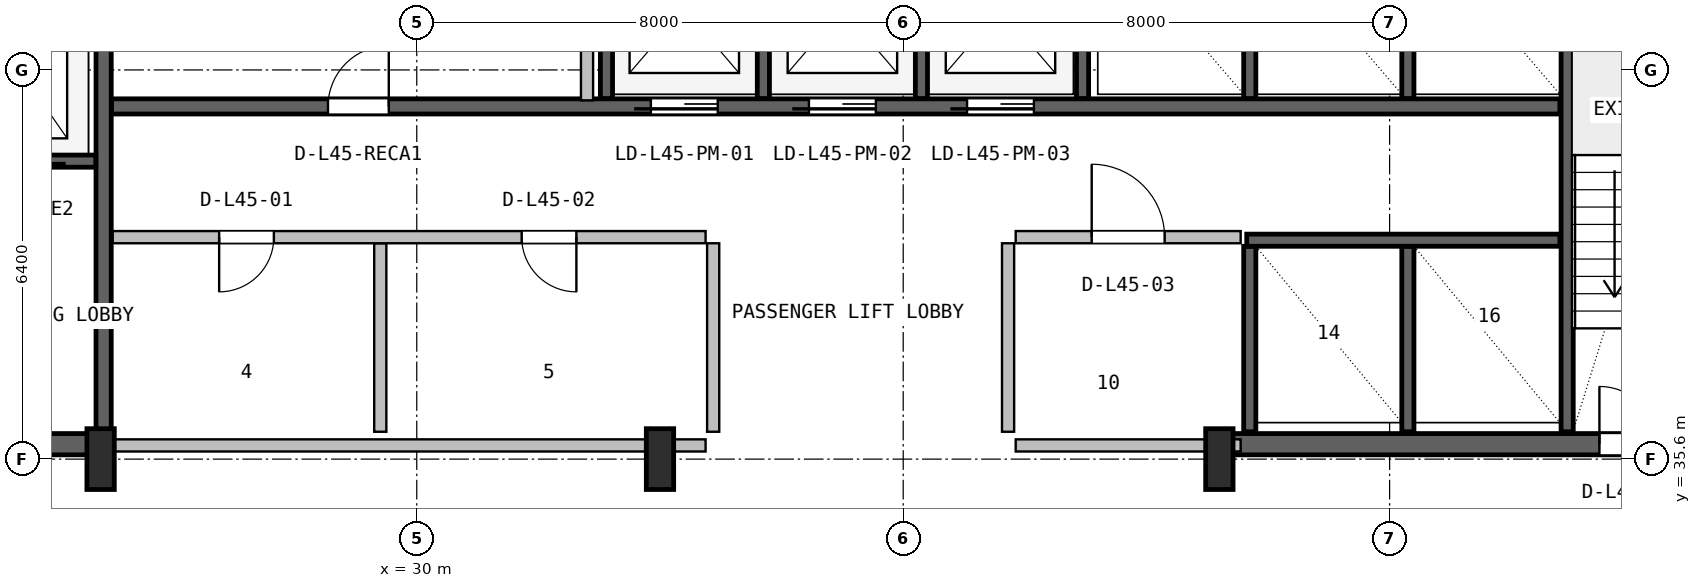
"""IFC4 building model, lengths in metres.
Left out: names, types, materials, properties, quantities, classifications, styles, units other than length and angle.
Written with IfcOpenShell. Run it as: python <this file> out.ifc"""

import sys

from ifc_helpers import new_model, si_unit, direction, frame, frame_2d, origin, origin_2d, place, context, subcontext, project, spatial, rectangle, i_section, extrude, source, transform, mapped, element, fill, save


model = new_model("IFC4")
c1 = context("Model", 3, precision=1e-05, world=origin(), true_north=direction((0.0, 1.0)))
c2 = subcontext(c1, "Body", "Model", "MODEL_VIEW")
j1 = project(units=[si_unit("LENGTHUNIT", "METRE"), si_unit("PLANEANGLEUNIT", "RADIAN")], contexts=[c1])
p1 = place(None, origin())
s1 = spatial("IfcSite", under=j1, at=p1, CompositionType="ELEMENT")
p2 = place(p1, origin())
s2 = spatial("IfcBuilding", under=s1, at=p2, CompositionType="ELEMENT")
p3 = place(p2, frame((0.0, 0.0, 183.8)))
s3 = spatial("IfcBuildingStorey", under=s2, at=p3, CompositionType="ELEMENT", Elevation=183.8)
p4 = place(p3, frame((15.67, 35.845, 0.0), z_axis=(0.0, 0.0, 1.0), x_axis=(1.0, 0.0, 0.0)))
e1 = element("IfcWall", 1, at=p4, inside=s3, PredefinedType="SHEAR", context=c2, shape_type="SweptSolid", body=[
    extrude(rectangle(XDim=9.13, YDim=0.35, at=frame_2d((4.565, 0.0))), origin(), (0.0, 0.0, 1.0), 3.55),
])
p5 = place(p4, frame((5.4, 0.0, 0.0)))
e2 = element("IfcOpeningElement", 2, at=p5, cuts=e1, PredefinedType="OPENING", context=c2, shape_type="SweptSolid", body=[
    extrude(rectangle(XDim=1.0, YDim=2.1, at=frame_2d((0.5, 1.05))), frame((0.0, 0.185, 0.0), z_axis=(0.0, -1.0, 0.0), x_axis=(1.0, 0.0, 0.0)), (0.0, 0.0, 1.0), 0.37),
])
p6 = place(p3, frame((43.2, 35.845, 0.0), z_axis=(0.0, 0.0, 1.0), x_axis=(1.0, 0.0, 0.0)))
e3 = element("IfcWall", 3, at=p6, inside=s3, PredefinedType="SHEAR", context=c2, shape_type="SweptSolid", body=[
    extrude(rectangle(XDim=9.13, YDim=0.35, at=frame_2d((4.565, 0.0))), origin(), (0.0, 0.0, 1.0), 3.55),
])
p7 = place(p6, frame((6.25, 0.0, 0.0)))
e4 = element("IfcOpeningElement", 4, at=p7, cuts=e3, PredefinedType="OPENING", context=c2, shape_type="SweptSolid", body=[
    extrude(rectangle(XDim=0.95, YDim=2.1, at=frame_2d((0.475, 1.05))), frame((0.0, 0.185, 0.0), z_axis=(0.0, -1.0, 0.0), x_axis=(1.0, 0.0, 0.0)), (0.0, 0.0, 1.0), 0.37),
])
m1 = source(origin(), c2, "Body", "SweptSolid", [
    extrude(i_section(OverallWidth=0.45, OverallDepth=1.0, WebThickness=0.016, FlangeThickness=0.03, FilletRadius=0.016, at=origin_2d()), origin(), (0.0, 0.0, 1.0), 3.8),
])
for number, where, z_axis, x_axis in (
    (5, (24.8, 35.6, 0.0), (0.0, 0.0, 1.0), (1.0, 0.0, 0.0)),
    (6, (34.0, 35.6, 0.0), (0.0, 0.0, 1.0), (1.0, 0.0, 0.0)),
    (7, (43.2, 35.6, 0.0), (0.0, 0.0, 1.0), (1.0, 0.0, 0.0)),
):
    element("IfcColumn", number, at=place(p3, frame(where, z_axis=z_axis, x_axis=x_axis)), inside=s3, PredefinedType="COLUMN", context=c2, shape_type="MappedRepresentation", body=[
        mapped(m1, transform((0.0, 0.0, 0.0), x_axis=(1.0, 0.0, 0.0), y_axis=(0.0, 1.0, 0.0), z_axis=(0.0, 0.0, 1.0), scale=1.0)),
    ])
p8 = place(p3, frame((24.85, 36.05, 0.0), z_axis=(0.0, 0.0, 1.0), x_axis=(0.0, 1.0, 0.0)))
e8 = element("IfcWall", 8, at=p8, inside=s3, PredefinedType="SHEAR", context=c2, shape_type="SweptSolid", body=[
    extrude(rectangle(XDim=10.45, YDim=0.25, at=frame_2d((5.225, 0.0))), origin(), (0.0, 0.0, 1.0), 3.55),
])
p9 = place(p3, frame((19.2, 40.5, 0.0), z_axis=(0.0, 0.0, 1.0), x_axis=(1.0, 0.0, 0.0)))
e9 = element("IfcWall", 9, at=p9, inside=s3, PredefinedType="SHEAR", context=c2, shape_type="SweptSolid", body=[
    extrude(rectangle(XDim=5.52, YDim=0.2, at=frame_2d((2.76, 0.0))), origin(), (0.0, 0.0, 1.0), 3.55),
])
p10 = place(p9, frame((1.05, 0.0, 0.0)))
e10 = element("IfcOpeningElement", 10, at=p10, cuts=e9, PredefinedType="OPENING", context=c2, shape_type="SweptSolid", body=[
    extrude(rectangle(XDim=1.1, YDim=2.18, at=frame_2d((0.55, 1.09))), frame((0.0, 0.11, 0.0), z_axis=(0.0, -1.0, 0.0), x_axis=(1.0, 0.0, 0.0)), (0.0, 0.0, 1.0), 0.22),
])
p11 = place(p9, frame((3.65, 0.0, 0.0)))
e11 = element("IfcOpeningElement", 11, at=p11, cuts=e9, PredefinedType="OPENING", context=c2, shape_type="SweptSolid", body=[
    extrude(rectangle(XDim=1.1, YDim=2.18, at=frame_2d((0.55, 1.09))), frame((0.0, 0.11, 0.0), z_axis=(0.0, -1.0, 0.0), x_axis=(1.0, 0.0, 0.0)), (0.0, 0.0, 1.0), 0.22),
])
p12 = place(p3, frame((48.92, 36.05, 0.0), z_axis=(0.0, 0.0, 1.0), x_axis=(0.0, 1.0, 0.0)))
e12 = element("IfcWall", 12, at=p12, inside=s3, PredefinedType="SHEAR", context=c2, shape_type="SweptSolid", body=[
    extrude(rectangle(XDim=10.5, YDim=0.2, at=frame_2d((5.25, 0.0))), origin(), (0.0, 0.0, 1.0), 3.55),
])
p13 = place(p3, frame((24.98, 41.4, 0.0), z_axis=(0.0, 0.0, 1.0), x_axis=(1.0, 0.0, 0.0)))
e13 = element("IfcWall", 13, at=p13, inside=s3, PredefinedType="SHEAR", context=c2, shape_type="SweptSolid", body=[
    extrude(rectangle(XDim=23.82, YDim=0.25, at=frame_2d((11.91, 0.0))), origin(), (0.0, 0.0, 1.0), 3.55),
])
p14 = place(p13, frame((8.87, 0.0, 0.0)))
e14 = element("IfcOpeningElement", 14, at=p14, cuts=e13, PredefinedType="OPENING", context=c2, shape_type="SweptSolid", body=[
    extrude(rectangle(XDim=1.1, YDim=2.18, at=frame_2d((0.55, 1.09))), frame((0.0, 0.135, 0.0), z_axis=(0.0, -1.0, 0.0), x_axis=(1.0, 0.0, 0.0)), (0.0, 0.0, 1.0), 0.27),
])
p15 = place(p13, frame((11.47, 0.0, 0.0)))
e15 = element("IfcOpeningElement", 15, at=p15, cuts=e13, PredefinedType="OPENING", context=c2, shape_type="SweptSolid", body=[
    extrude(rectangle(XDim=1.1, YDim=2.18, at=frame_2d((0.55, 1.09))), frame((0.0, 0.135, 0.0), z_axis=(0.0, -1.0, 0.0), x_axis=(1.0, 0.0, 0.0)), (0.0, 0.0, 1.0), 0.27),
])
p16 = place(p13, frame((14.07, 0.0, 0.0)))
e16 = element("IfcOpeningElement", 16, at=p16, cuts=e13, PredefinedType="OPENING", context=c2, shape_type="SweptSolid", body=[
    extrude(rectangle(XDim=1.1, YDim=2.18, at=frame_2d((0.55, 1.09))), frame((0.0, 0.135, 0.0), z_axis=(0.0, -1.0, 0.0), x_axis=(1.0, 0.0, 0.0)), (0.0, 0.0, 1.0), 0.27),
])
p17 = place(p13, frame((3.56, 0.0, 0.0)))
e17 = element("IfcOpeningElement", 17, at=p17, cuts=e13, PredefinedType="OPENING", context=c2, shape_type="SweptSolid", body=[
    extrude(rectangle(XDim=1.0, YDim=2.08, at=frame_2d((0.5, 1.04))), frame((0.0, 0.135, 0.0), z_axis=(0.0, -1.0, 0.0), x_axis=(1.0, 0.0, 0.0)), (0.0, 0.0, 1.0), 0.27),
])
p18 = place(p3, frame((33.12, 41.53, 0.0), z_axis=(0.0, 0.0, 1.0), x_axis=(0.0, 1.0, 0.0)))
e18 = element("IfcWall", 18, at=p18, inside=s3, PredefinedType="SHEAR", context=c2, shape_type="SweptSolid", body=[
    extrude(rectangle(XDim=5.02, YDim=0.2, at=frame_2d((2.51, 0.0))), origin(), (0.0, 0.0, 1.0), 3.55),
])
for number, where, z_axis, x_axis in (
    (19, (35.7, 41.53, 0.0), (0.0, 0.0, 1.0), (0.0, 1.0, 0.0)),
    (20, (38.3, 41.53, 0.0), (0.0, 0.0, 1.0), (0.0, 1.0, 0.0)),
):
    element("IfcWall", number, at=place(p3, frame(where, z_axis=z_axis, x_axis=x_axis)), inside=s3, PredefinedType="SHEAR", context=c2, shape_type="SweptSolid", body=[
        extrude(rectangle(XDim=2.87, YDim=0.2, at=frame_2d((1.435, 0.0))), origin(), (0.0, 0.0, 1.0), 3.55),
    ])
p19 = place(p3, frame((40.95, 41.53, 0.0), z_axis=(0.0, 0.0, 1.0), x_axis=(0.0, 1.0, 0.0)))
e21 = element("IfcWall", 21, at=p19, inside=s3, PredefinedType="SHEAR", context=c2, shape_type="SweptSolid", body=[
    extrude(rectangle(XDim=5.02, YDim=0.2, at=frame_2d((2.51, 0.0))), origin(), (0.0, 0.0, 1.0), 3.55),
])
for number, where, z_axis, x_axis in (
    (22, (43.7, 41.53, 0.0), (0.0, 0.0, 1.0), (0.0, 1.0, 0.0)),
    (23, (46.3, 41.53, 0.0), (0.0, 0.0, 1.0), (0.0, 1.0, 0.0)),
):
    element("IfcWall", number, at=place(p3, frame(where, z_axis=z_axis, x_axis=x_axis)), inside=s3, PredefinedType="SHEAR", context=c2, shape_type="SweptSolid", body=[
        extrude(rectangle(XDim=2.87, YDim=0.2, at=frame_2d((1.435, 0.0))), origin(), (0.0, 0.0, 1.0), 3.55),
    ])
for number, where, z_axis, x_axis in (
    (24, (43.7, 36.05, 0.0), (0.0, 0.0, 1.0), (0.0, 1.0, 0.0)),
    (25, (46.3, 36.05, 0.0), (0.0, 0.0, 1.0), (0.0, 1.0, 0.0)),
):
    element("IfcWall", number, at=place(p3, frame(where, z_axis=z_axis, x_axis=x_axis)), inside=s3, PredefinedType="SHEAR", context=c2, shape_type="SweptSolid", body=[
        extrude(rectangle(XDim=3.05, YDim=0.2, at=frame_2d((1.525, 0.0))), origin(), (0.0, 0.0, 1.0), 3.55),
    ])
p20 = place(p3, frame((43.65, 39.2, 0.0), z_axis=(0.0, 0.0, 1.0), x_axis=(1.0, 0.0, 0.0)))
e26 = element("IfcWall", 26, at=p20, inside=s3, PredefinedType="SHEAR", context=c2, shape_type="SweptSolid", body=[
    extrude(rectangle(XDim=5.15, YDim=0.2, at=frame_2d((2.575, 0.0))), origin(), (0.0, 0.0, 1.0), 3.55),
])
p21 = place(p3, frame((25.0, 35.825, 0.0), z_axis=(0.0, 0.0, 1.0), x_axis=(1.0, 0.0, 0.0)))
e27 = element("IfcWall", 27, at=p21, inside=s3, PredefinedType="PLUMBINGWALL", context=c2, shape_type="SweptSolid", body=[
    extrude(rectangle(XDim=9.75, YDim=0.2, at=frame_2d((4.875, 0.0))), origin(), (0.0, 0.0, 1.0), 2.575),
])
p22 = place(p3, frame((29.4, 36.05, 0.0), z_axis=(0.0, 0.0, 1.0), x_axis=(0.0, 1.0, 0.0)))
e28 = element("IfcWall", 28, at=p22, inside=s3, PredefinedType="PLUMBINGWALL", context=c2, shape_type="SweptSolid", body=[
    extrude(rectangle(XDim=3.1, YDim=0.2, at=frame_2d((1.55, 0.0))), origin(), (0.0, 0.0, 1.0), 3.53),
])
p23 = place(p3, frame((25.0, 39.25, 0.0), z_axis=(0.0, 0.0, 1.0), x_axis=(1.0, 0.0, 0.0)))
e29 = element("IfcWall", 29, at=p23, inside=s3, PredefinedType="PLUMBINGWALL", context=c2, shape_type="SweptSolid", body=[
    extrude(rectangle(XDim=9.75, YDim=0.2, at=frame_2d((4.875, 0.0))), origin(), (0.0, 0.0, 1.0), 3.53),
])
p24 = place(p23, frame((1.75, 0.0, 0.0)))
e30 = element("IfcOpeningElement", 30, at=p24, cuts=e29, PredefinedType="OPENING", context=c2, shape_type="SweptSolid", body=[
    extrude(rectangle(XDim=0.9, YDim=2.06, at=frame_2d((0.45, 1.03))), frame((0.0, 0.11, 0.0), z_axis=(0.0, -1.0, 0.0), x_axis=(1.0, 0.0, 0.0)), (0.0, 0.0, 1.0), 0.22),
])
p25 = place(p23, frame((6.725, 0.0, 0.0)))
e31 = element("IfcOpeningElement", 31, at=p25, cuts=e29, PredefinedType="OPENING", context=c2, shape_type="SweptSolid", body=[
    extrude(rectangle(XDim=0.9, YDim=2.06, at=frame_2d((0.45, 1.03))), frame((0.0, 0.11, 0.0), z_axis=(0.0, -1.0, 0.0), x_axis=(1.0, 0.0, 0.0)), (0.0, 0.0, 1.0), 0.22),
])
p26 = place(p3, frame((34.875, 36.05, 0.0), z_axis=(0.0, 0.0, 1.0), x_axis=(0.0, 1.0, 0.0)))
e32 = element("IfcWall", 32, at=p26, inside=s3, PredefinedType="PLUMBINGWALL", context=c2, shape_type="SweptSolid", body=[
    extrude(rectangle(XDim=3.1, YDim=0.2, at=frame_2d((1.55, 0.0))), origin(), (0.0, 0.0, 1.0), 3.53),
])
p27 = place(p3, frame((39.85, 35.825, 0.0), z_axis=(0.0, 0.0, 1.0), x_axis=(1.0, 0.0, 0.0)))
e33 = element("IfcWall", 33, at=p27, inside=s3, PredefinedType="SOLIDWALL", context=c2, shape_type="SweptSolid", body=[
    extrude(rectangle(XDim=3.7, YDim=0.2, at=frame_2d((1.85, 0.0))), origin(), (0.0, 0.0, 1.0), 2.575),
])
p28 = place(p3, frame((39.85, 39.25, 0.0), z_axis=(0.0, 0.0, 1.0), x_axis=(1.0, 0.0, 0.0)))
e34 = element("IfcWall", 34, at=p28, inside=s3, PredefinedType="SOLIDWALL", context=c2, shape_type="SweptSolid", body=[
    extrude(rectangle(XDim=3.7, YDim=0.2, at=frame_2d((1.85, 0.0))), origin(), (0.0, 0.0, 1.0), 3.53),
])
p29 = place(p28, frame((1.25, 0.0, 0.0)))
e35 = element("IfcOpeningElement", 35, at=p29, cuts=e34, PredefinedType="OPENING", context=c2, shape_type="SweptSolid", body=[
    extrude(rectangle(XDim=1.2, YDim=2.1, at=frame_2d((0.6, 1.05))), frame((0.0, 0.11, 0.0), z_axis=(0.0, -1.0, 0.0), x_axis=(1.0, 0.0, 0.0)), (0.0, 0.0, 1.0), 0.22),
])
p30 = place(p3, frame((39.725, 36.05, 0.0), z_axis=(0.0, 0.0, 1.0), x_axis=(0.0, 1.0, 0.0)))
e36 = element("IfcWall", 36, at=p30, inside=s3, PredefinedType="SOLIDWALL", context=c2, shape_type="SweptSolid", body=[
    extrude(rectangle(XDim=3.1, YDim=0.2, at=frame_2d((1.55, 0.0))), origin(), (0.0, 0.0, 1.0), 3.53),
])
p31 = place(p3, frame((32.8, 41.5, 0.0), z_axis=(0.0, 0.0, 1.0), x_axis=(0.0, 1.0, 0.0)))
e37 = element("IfcWall", 37, at=p31, inside=s3, PredefinedType="SOLIDWALL", context=c2, shape_type="SweptSolid", body=[
    extrude(rectangle(XDim=5.02, YDim=0.2, at=frame_2d((2.51, 0.0))), origin(), (0.0, 0.0, 1.0), 3.53),
])
m2 = source(origin(), c2, "Body", "SweptSolid", [
    extrude(rectangle(XDim=0.95, YDim=2.1, at=frame_2d((0.475, 1.05))), frame((0.0, 0.025, 0.0), z_axis=(0.0, -1.0, 0.0), x_axis=(1.0, 0.0, 0.0)), (0.0, 0.0, 1.0), 0.05),
])
p32 = place(p7, origin())
e38 = element("IfcDoor", 38, at=p32, inside=s3, OperationType="SINGLE_SWING_LEFT", PredefinedType="DOOR", context=c2, shape_type="MappedRepresentation", body=[
    mapped(m2, transform((0.0, 0.0, 0.0), x_axis=(1.0, 0.0, 0.0), y_axis=(0.0, 1.0, 0.0), z_axis=(0.0, 0.0, 1.0), scale=1.0)),
])
fill(e4, e38)
m3 = source(origin(), c2, "Body", "SweptSolid", [
    extrude(rectangle(XDim=1.1, YDim=2.18, at=frame_2d((0.55, 1.09))), frame((0.0, 0.025, 0.0), z_axis=(0.0, -1.0, 0.0), x_axis=(1.0, 0.0, 0.0)), (0.0, 0.0, 1.0), 0.05),
])
p33 = place(p14, frame((1.1, 0.0, 0.0), z_axis=(0.0, 0.0, 1.0), x_axis=(-1.0, 0.0, 0.0)))
e39 = element("IfcDoor", 39, at=p33, inside=s3, OperationType="SLIDING_TO_LEFT", PredefinedType="DOOR", context=c2, shape_type="MappedRepresentation", body=[
    mapped(m3, transform((0.0, 0.0, 0.0), x_axis=(1.0, 0.0, 0.0), y_axis=(0.0, 1.0, 0.0), z_axis=(0.0, 0.0, 1.0), scale=1.0)),
])
fill(e14, e39)
p34 = place(p15, frame((1.1, 0.0, 0.0), z_axis=(0.0, 0.0, 1.0), x_axis=(-1.0, 0.0, 0.0)))
e40 = element("IfcDoor", 40, at=p34, inside=s3, OperationType="SLIDING_TO_LEFT", PredefinedType="DOOR", context=c2, shape_type="MappedRepresentation", body=[
    mapped(m3, transform((0.0, 0.0, 0.0), x_axis=(1.0, 0.0, 0.0), y_axis=(0.0, 1.0, 0.0), z_axis=(0.0, 0.0, 1.0), scale=1.0)),
])
fill(e15, e40)
p35 = place(p16, frame((1.1, 0.0, 0.0), z_axis=(0.0, 0.0, 1.0), x_axis=(-1.0, 0.0, 0.0)))
e41 = element("IfcDoor", 41, at=p35, inside=s3, OperationType="SLIDING_TO_LEFT", PredefinedType="DOOR", context=c2, shape_type="MappedRepresentation", body=[
    mapped(m3, transform((0.0, 0.0, 0.0), x_axis=(1.0, 0.0, 0.0), y_axis=(0.0, 1.0, 0.0), z_axis=(0.0, 0.0, 1.0), scale=1.0)),
])
fill(e16, e41)
m4 = source(origin(), c2, "Body", "SweptSolid", [
    extrude(rectangle(XDim=1.0, YDim=2.08, at=frame_2d((0.5, 1.04))), frame((0.0, 0.025, 0.0), z_axis=(0.0, -1.0, 0.0), x_axis=(1.0, 0.0, 0.0)), (0.0, 0.0, 1.0), 0.05),
])
p36 = place(p17, origin())
e42 = element("IfcDoor", 42, at=p36, inside=s3, OperationType="SINGLE_SWING_RIGHT", PredefinedType="DOOR", context=c2, shape_type="MappedRepresentation", body=[
    mapped(m4, transform((0.0, 0.0, 0.0), x_axis=(1.0, 0.0, 0.0), y_axis=(0.0, 1.0, 0.0), z_axis=(0.0, 0.0, 1.0), scale=1.0)),
])
fill(e17, e42)
m5 = source(origin(), c2, "Body", "SweptSolid", [
    extrude(rectangle(XDim=0.9, YDim=2.06, at=frame_2d((0.45, 1.03))), frame((0.0, 0.025, 0.0), z_axis=(0.0, -1.0, 0.0), x_axis=(1.0, 0.0, 0.0)), (0.0, 0.0, 1.0), 0.05),
])
p37 = place(p24, frame((0.9, 0.0, 0.0), z_axis=(0.0, 0.0, 1.0), x_axis=(-1.0, 0.0, 0.0)))
e43 = element("IfcDoor", 43, at=p37, inside=s3, OperationType="SINGLE_SWING_LEFT", PredefinedType="DOOR", context=c2, shape_type="MappedRepresentation", body=[
    mapped(m5, transform((0.0, 0.0, 0.0), x_axis=(1.0, 0.0, 0.0), y_axis=(0.0, 1.0, 0.0), z_axis=(0.0, 0.0, 1.0), scale=1.0)),
])
fill(e30, e43)
p38 = place(p25, frame((0.9, 0.0, 0.0), z_axis=(0.0, 0.0, 1.0), x_axis=(-1.0, 0.0, 0.0)))
e44 = element("IfcDoor", 44, at=p38, inside=s3, OperationType="SINGLE_SWING_RIGHT", PredefinedType="DOOR", context=c2, shape_type="MappedRepresentation", body=[
    mapped(m5, transform((0.0, 0.0, 0.0), x_axis=(1.0, 0.0, 0.0), y_axis=(0.0, 1.0, 0.0), z_axis=(0.0, 0.0, 1.0), scale=1.0)),
])
fill(e31, e44)
m6 = source(origin(), c2, "Body", "SweptSolid", [
    extrude(rectangle(XDim=1.2, YDim=2.1, at=frame_2d((0.6, 1.05))), frame((0.0, 0.025, 0.0), z_axis=(0.0, -1.0, 0.0), x_axis=(1.0, 0.0, 0.0)), (0.0, 0.0, 1.0), 0.05),
])
p39 = place(p29, origin())
e45 = element("IfcDoor", 45, at=p39, inside=s3, OperationType="SINGLE_SWING_LEFT", PredefinedType="DOOR", context=c2, shape_type="MappedRepresentation", body=[
    mapped(m6, transform((0.0, 0.0, 0.0), x_axis=(1.0, 0.0, 0.0), y_axis=(0.0, 1.0, 0.0), z_axis=(0.0, 0.0, 1.0), scale=1.0)),
])
fill(e35, e45)
save(model, sys.argv[1])
